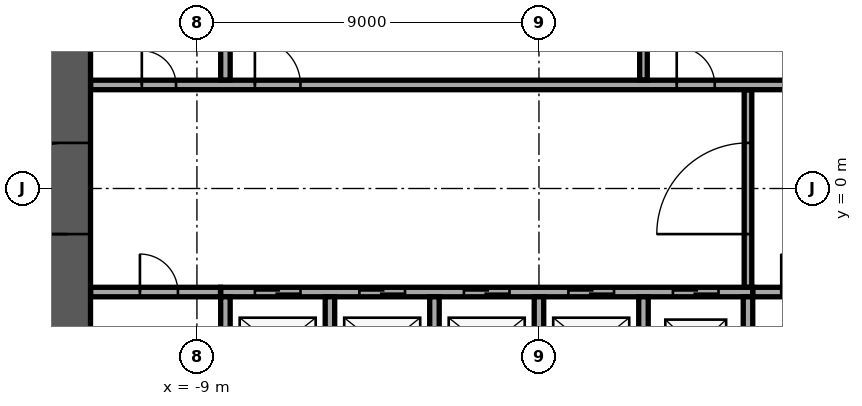
"""IFC4 building model, lengths in metres.
Left out: names, types, materials, properties, quantities, classifications, styles, units other than length and angle.
Written with IfcOpenShell. Run it as: python <this file> out.ifc"""

import sys

from ifc_helpers import new_model, si_unit, direction, frame, frame_2d, origin, place, context, subcontext, project, spatial, rectangle, extrude, element, fill, save


model = new_model("IFC4")
c1 = context("Model", 3, precision=1e-05, world=origin(), true_north=direction((0.0, 1.0)))
c2 = subcontext(c1, "Body", "Model", "MODEL_VIEW")
j1 = project(units=[si_unit("LENGTHUNIT", "METRE"), si_unit("PLANEANGLEUNIT", "RADIAN")], contexts=[c1])
p1 = place(None, origin())
s1 = spatial("IfcSite", under=j1, at=p1, CompositionType="ELEMENT")
p2 = place(p1, origin())
s2 = spatial("IfcBuilding", under=s1, at=p2, CompositionType="ELEMENT")
p3 = place(p2, origin())
s3 = spatial("IfcBuildingStorey", under=s2, at=p3, CompositionType="ELEMENT", Elevation=0.0)
p4 = place(p3, frame((-12.4, -11.8, 0.0), z_axis=(0.0, 0.0, 1.0), x_axis=(0.0, 1.0, 0.0)))
e1 = element("IfcWall", 1, at=p4, inside=s3, PredefinedType="SHEAR", context=c2, shape_type="SweptSolid", body=[
    extrude(rectangle(XDim=23.6, YDim=1.2, at=frame_2d((11.8, 0.0))), origin(), (0.0, 0.0, 1.0), 4.1),
])
p5 = place(p4, frame((10.6, 0.0, 0.0)))
e2 = element("IfcOpeningElement", 2, at=p5, cuts=e1, PredefinedType="OPENING", context=c2, shape_type="SweptSolid", body=[
    extrude(rectangle(XDim=2.4, YDim=2.4, at=frame_2d((1.2, 1.2))), frame((0.0, 0.61, 0.0), z_axis=(0.0, -1.0, 0.0), x_axis=(1.0, 0.0, 0.0)), (0.0, 0.0, 1.0), 1.22),
])
p6 = place(p3, frame((-8.375, -2.725, 0.0), z_axis=(0.0, 0.0, 1.0), x_axis=(1.0, 0.0, 0.0)))
e3 = element("IfcWall", 3, at=p6, inside=s3, PredefinedType="SOLIDWALL", context=c2, shape_type="SweptSolid", body=[
    extrude(rectangle(XDim=14.0, YDim=0.25, at=frame_2d((7.0, 0.0))), origin(), (0.0, 0.0, 1.0), 4.1),
])
p7 = place(p6, frame((0.9, 0.0, 0.0)))
e4 = element("IfcOpeningElement", 4, at=p7, cuts=e3, PredefinedType="OPENING", context=c2, shape_type="SweptSolid", body=[
    extrude(rectangle(XDim=1.2, YDim=2.1, at=frame_2d((0.6, 1.05))), frame((0.0, 0.135, 0.0), z_axis=(0.0, -1.0, 0.0), x_axis=(1.0, 0.0, 0.0)), (0.0, 0.0, 1.0), 0.27),
])
p8 = place(p6, frame((3.65, 0.0, 0.0)))
e5 = element("IfcOpeningElement", 5, at=p8, cuts=e3, PredefinedType="OPENING", context=c2, shape_type="SweptSolid", body=[
    extrude(rectangle(XDim=1.2, YDim=2.1, at=frame_2d((0.6, 1.05))), frame((0.0, 0.135, 0.0), z_axis=(0.0, -1.0, 0.0), x_axis=(1.0, 0.0, 0.0)), (0.0, 0.0, 1.0), 0.27),
])
p9 = place(p6, frame((6.4, 0.0, 0.0)))
e6 = element("IfcOpeningElement", 6, at=p9, cuts=e3, PredefinedType="OPENING", context=c2, shape_type="SweptSolid", body=[
    extrude(rectangle(XDim=1.2, YDim=2.1, at=frame_2d((0.6, 1.05))), frame((0.0, 0.135, 0.0), z_axis=(0.0, -1.0, 0.0), x_axis=(1.0, 0.0, 0.0)), (0.0, 0.0, 1.0), 0.27),
])
p10 = place(p6, frame((9.15, 0.0, 0.0)))
e7 = element("IfcOpeningElement", 7, at=p10, cuts=e3, PredefinedType="OPENING", context=c2, shape_type="SweptSolid", body=[
    extrude(rectangle(XDim=1.2, YDim=2.1, at=frame_2d((0.6, 1.05))), frame((0.0, 0.135, 0.0), z_axis=(0.0, -1.0, 0.0), x_axis=(1.0, 0.0, 0.0)), (0.0, 0.0, 1.0), 0.27),
])
p11 = place(p6, frame((11.9, 0.0, 0.0)))
e8 = element("IfcOpeningElement", 8, at=p11, cuts=e3, PredefinedType="OPENING", context=c2, shape_type="SweptSolid", body=[
    extrude(rectangle(XDim=1.2, YDim=2.1, at=frame_2d((0.6, 1.05))), frame((0.0, 0.135, 0.0), z_axis=(0.0, -1.0, 0.0), x_axis=(1.0, 0.0, 0.0)), (0.0, 0.0, 1.0), 0.27),
])
for number, where, z_axis, x_axis in (
    (9, (-8.25, -5.55, 0.0), (0.0, 0.0, 1.0), (0.0, 1.0, 0.0)),
    (10, (-5.5, -5.55, 0.0), (0.0, 0.0, 1.0), (0.0, 1.0, 0.0)),
    (11, (-2.75, -5.55, 0.0), (0.0, 0.0, 1.0), (0.0, 1.0, 0.0)),
    (12, (0.0, -5.55, 0.0), (0.0, 0.0, 1.0), (0.0, 1.0, 0.0)),
    (13, (2.75, -5.55, 0.0), (0.0, 0.0, 1.0), (0.0, 1.0, 0.0)),
    (14, (5.5, -5.55, 0.0), (0.0, 0.0, 1.0), (0.0, 1.0, 0.0)),
):
    element("IfcWall", number, at=place(p3, frame(where, z_axis=z_axis, x_axis=x_axis)), inside=s3, PredefinedType="SOLIDWALL", context=c2, shape_type="SweptSolid", body=[
        extrude(rectangle(XDim=2.7, YDim=0.25, at=frame_2d((1.35, 0.0))), origin(), (0.0, 0.0, 1.0), 4.1),
    ])
p12 = place(p3, frame((-11.795, -2.725, 0.0), z_axis=(0.0, 0.0, 1.0), x_axis=(1.0, 0.0, 0.0)))
e15 = element("IfcWall", 15, at=p12, inside=s3, PredefinedType="PARTITIONING", context=c2, shape_type="SweptSolid", body=[
    extrude(rectangle(XDim=3.415, YDim=0.25, at=frame_2d((1.708, 0.0))), origin(), (0.0, 0.0, 1.0), 4.1),
])
p13 = place(p12, frame((1.295, 0.0, 0.0)))
e16 = element("IfcOpeningElement", 16, at=p13, cuts=e15, PredefinedType="OPENING", context=c2, shape_type="SweptSolid", body=[
    extrude(rectangle(XDim=1.0, YDim=2.1, at=frame_2d((0.5, 1.05))), frame((0.0, 0.135, 0.0), z_axis=(0.0, -1.0, 0.0), x_axis=(1.0, 0.0, 0.0)), (0.0, 0.0, 1.0), 0.27),
])
p14 = place(p3, frame((5.63, -2.725, 0.0), z_axis=(0.0, 0.0, 1.0), x_axis=(1.0, 0.0, 0.0)))
e17 = element("IfcWall", 17, at=p14, inside=s3, PredefinedType="PARTITIONING", context=c2, shape_type="SweptSolid", body=[
    extrude(rectangle(XDim=6.165, YDim=0.25, at=frame_2d((3.083, 0.0))), origin(), (0.0, 0.0, 1.0), 4.1),
])
p15 = place(p14, frame((0.745, 0.0, 0.0)))
e18 = element("IfcOpeningElement", 18, at=p15, cuts=e17, PredefinedType="OPENING", context=c2, shape_type="SweptSolid", body=[
    extrude(rectangle(XDim=1.0, YDim=2.1, at=frame_2d((0.5, 1.05))), frame((0.0, 0.135, 0.0), z_axis=(0.0, -1.0, 0.0), x_axis=(1.0, 0.0, 0.0)), (0.0, 0.0, 1.0), 0.27),
])
p16 = place(p14, frame((3.92, 0.0, 0.0)))
e19 = element("IfcOpeningElement", 19, at=p16, cuts=e17, PredefinedType="OPENING", context=c2, shape_type="SweptSolid", body=[
    extrude(rectangle(XDim=0.9, YDim=2.1, at=frame_2d((0.45, 1.05))), frame((0.0, 0.135, 0.0), z_axis=(0.0, -1.0, 0.0), x_axis=(1.0, 0.0, 0.0)), (0.0, 0.0, 1.0), 0.27),
])
p17 = place(p3, frame((5.5, -2.595, 0.0), z_axis=(0.0, 0.0, 1.0), x_axis=(0.0, 1.0, 0.0)))
e20 = element("IfcWall", 20, at=p17, inside=s3, PredefinedType="PARTITIONING", context=c2, shape_type="SweptSolid", body=[
    extrude(rectangle(XDim=5.19, YDim=0.2, at=frame_2d((2.595, 0.0))), origin(), (0.0, 0.0, 1.0), 4.1),
])
p18 = place(p17, frame((1.395, 0.0, 0.0)))
e21 = element("IfcOpeningElement", 21, at=p18, cuts=e20, PredefinedType="OPENING", context=c2, shape_type="SweptSolid", body=[
    extrude(rectangle(XDim=2.4, YDim=2.4, at=frame_2d((1.2, 1.2))), frame((0.0, 0.11, 0.0), z_axis=(0.0, -1.0, 0.0), x_axis=(1.0, 0.0, 0.0)), (0.0, 0.0, 1.0), 0.22),
])
p19 = place(p3, frame((-11.795, 2.725, 0.0), z_axis=(0.0, 0.0, 1.0), x_axis=(1.0, 0.0, 0.0)))
e22 = element("IfcWall", 22, at=p19, inside=s3, PredefinedType="PARTITIONING", context=c2, shape_type="SweptSolid", body=[
    extrude(rectangle(XDim=23.59, YDim=0.25, at=frame_2d((11.795, 0.0))), origin(), (0.0, 0.0, 1.0), 4.1),
])
p20 = place(p19, frame((21.345, 0.0, 0.0)))
e23 = element("IfcOpeningElement", 23, at=p20, cuts=e22, PredefinedType="OPENING", context=c2, shape_type="SweptSolid", body=[
    extrude(rectangle(XDim=0.9, YDim=2.1, at=frame_2d((0.45, 1.05))), frame((0.0, 0.135, 0.0), z_axis=(0.0, -1.0, 0.0), x_axis=(1.0, 0.0, 0.0)), (0.0, 0.0, 1.0), 0.27),
])
p21 = place(p19, frame((1.345, 0.0, 0.0)))
e24 = element("IfcOpeningElement", 24, at=p21, cuts=e22, PredefinedType="OPENING", context=c2, shape_type="SweptSolid", body=[
    extrude(rectangle(XDim=0.9, YDim=2.1, at=frame_2d((0.45, 1.05))), frame((0.0, 0.135, 0.0), z_axis=(0.0, -1.0, 0.0), x_axis=(1.0, 0.0, 0.0)), (0.0, 0.0, 1.0), 0.27),
])
p22 = place(p19, frame((4.32, 0.0, 0.0)))
e25 = element("IfcOpeningElement", 25, at=p22, cuts=e22, PredefinedType="OPENING", context=c2, shape_type="SweptSolid", body=[
    extrude(rectangle(XDim=1.2, YDim=2.1, at=frame_2d((0.6, 1.05))), frame((0.0, 0.135, 0.0), z_axis=(0.0, -1.0, 0.0), x_axis=(1.0, 0.0, 0.0)), (0.0, 0.0, 1.0), 0.27),
])
p23 = place(p19, frame((15.42, 0.0, 0.0)))
e26 = element("IfcOpeningElement", 26, at=p23, cuts=e22, PredefinedType="OPENING", context=c2, shape_type="SweptSolid", body=[
    extrude(rectangle(XDim=1.0, YDim=2.1, at=frame_2d((0.5, 1.05))), frame((0.0, 0.135, 0.0), z_axis=(0.0, -1.0, 0.0), x_axis=(1.0, 0.0, 0.0)), (0.0, 0.0, 1.0), 0.27),
])
p24 = place(p3, frame((-8.25, 2.855, 0.0), z_axis=(0.0, 0.0, 1.0), x_axis=(0.0, 1.0, 0.0)))
e27 = element("IfcWall", 27, at=p24, inside=s3, PredefinedType="PARTITIONING", context=c2, shape_type="SweptSolid", body=[
    extrude(rectangle(XDim=1.715, YDim=0.25, at=frame_2d((0.857, 0.0))), origin(), (0.0, 0.0, 1.0), 4.1),
])
p25 = place(p3, frame((2.75, 2.855, 0.0), z_axis=(0.0, 0.0, 1.0), x_axis=(0.0, 1.0, 0.0)))
e28 = element("IfcWall", 28, at=p25, inside=s3, PredefinedType="PARTITIONING", context=c2, shape_type="SweptSolid", body=[
    extrude(rectangle(XDim=2.69, YDim=0.2, at=frame_2d((1.345, 0.0))), origin(), (0.0, 0.0, 1.0), 4.1),
])
p26 = place(p5, origin())
e29 = element("IfcDoor", 29, at=p26, inside=s3, OperationType="SINGLE_SWING_LEFT", PredefinedType="DOOR", context=c2, shape_type="SweptSolid", body=[
    extrude(rectangle(XDim=2.4, YDim=2.4, at=frame_2d((1.2, 1.2))), frame((0.0, 0.025, 0.0), z_axis=(0.0, -1.0, 0.0), x_axis=(1.0, 0.0, 0.0)), (0.0, 0.0, 1.0), 0.05),
])
fill(e2, e29)
p27 = place(p7, origin())
e30 = element("IfcDoor", 30, at=p27, inside=s3, OperationType="DOUBLE_DOOR_SLIDING", PredefinedType="DOOR", context=c2, shape_type="SweptSolid", body=[
    extrude(rectangle(XDim=1.2, YDim=2.1, at=frame_2d((0.6, 1.05))), frame((0.0, 0.025, 0.0), z_axis=(0.0, -1.0, 0.0), x_axis=(1.0, 0.0, 0.0)), (0.0, 0.0, 1.0), 0.05),
])
fill(e4, e30)
p28 = place(p8, origin())
e31 = element("IfcDoor", 31, at=p28, inside=s3, OperationType="DOUBLE_DOOR_SLIDING", PredefinedType="DOOR", context=c2, shape_type="SweptSolid", body=[
    extrude(rectangle(XDim=1.2, YDim=2.1, at=frame_2d((0.6, 1.05))), frame((0.0, 0.025, 0.0), z_axis=(0.0, -1.0, 0.0), x_axis=(1.0, 0.0, 0.0)), (0.0, 0.0, 1.0), 0.05),
])
fill(e5, e31)
p29 = place(p9, origin())
e32 = element("IfcDoor", 32, at=p29, inside=s3, OperationType="DOUBLE_DOOR_SLIDING", PredefinedType="DOOR", context=c2, shape_type="SweptSolid", body=[
    extrude(rectangle(XDim=1.2, YDim=2.1, at=frame_2d((0.6, 1.05))), frame((0.0, 0.025, 0.0), z_axis=(0.0, -1.0, 0.0), x_axis=(1.0, 0.0, 0.0)), (0.0, 0.0, 1.0), 0.05),
])
fill(e6, e32)
p30 = place(p10, origin())
e33 = element("IfcDoor", 33, at=p30, inside=s3, OperationType="DOUBLE_DOOR_SLIDING", PredefinedType="DOOR", context=c2, shape_type="SweptSolid", body=[
    extrude(rectangle(XDim=1.2, YDim=2.1, at=frame_2d((0.6, 1.05))), frame((0.0, 0.025, 0.0), z_axis=(0.0, -1.0, 0.0), x_axis=(1.0, 0.0, 0.0)), (0.0, 0.0, 1.0), 0.05),
])
fill(e7, e33)
p31 = place(p11, origin())
e34 = element("IfcDoor", 34, at=p31, inside=s3, OperationType="DOUBLE_DOOR_SLIDING", PredefinedType="DOOR", context=c2, shape_type="SweptSolid", body=[
    extrude(rectangle(XDim=1.2, YDim=2.1, at=frame_2d((0.6, 1.05))), frame((0.0, 0.025, 0.0), z_axis=(0.0, -1.0, 0.0), x_axis=(1.0, 0.0, 0.0)), (0.0, 0.0, 1.0), 0.05),
])
fill(e8, e34)
p32 = place(p13, origin())
e35 = element("IfcDoor", 35, at=p32, inside=s3, OperationType="SINGLE_SWING_LEFT", PredefinedType="DOOR", context=c2, shape_type="SweptSolid", body=[
    extrude(rectangle(XDim=1.0, YDim=2.1, at=frame_2d((0.5, 1.05))), frame((0.0, 0.025, 0.0), z_axis=(0.0, -1.0, 0.0), x_axis=(1.0, 0.0, 0.0)), (0.0, 0.0, 1.0), 0.05),
])
fill(e16, e35)
p33 = place(p15, origin())
e36 = element("IfcDoor", 36, at=p33, inside=s3, OperationType="SINGLE_SWING_LEFT", PredefinedType="DOOR", context=c2, shape_type="SweptSolid", body=[
    extrude(rectangle(XDim=1.0, YDim=2.1, at=frame_2d((0.5, 1.05))), frame((0.0, 0.025, 0.0), z_axis=(0.0, -1.0, 0.0), x_axis=(1.0, 0.0, 0.0)), (0.0, 0.0, 1.0), 0.05),
])
fill(e18, e36)
p34 = place(p21, origin())
e37 = element("IfcDoor", 37, at=p34, inside=s3, OperationType="SINGLE_SWING_LEFT", PredefinedType="DOOR", context=c2, shape_type="SweptSolid", body=[
    extrude(rectangle(XDim=0.9, YDim=2.1, at=frame_2d((0.45, 1.05))), frame((0.0, 0.025, 0.0), z_axis=(0.0, -1.0, 0.0), x_axis=(1.0, 0.0, 0.0)), (0.0, 0.0, 1.0), 0.05),
])
fill(e24, e37)
p35 = place(p22, origin())
e38 = element("IfcDoor", 38, at=p35, inside=s3, OperationType="SINGLE_SWING_LEFT", PredefinedType="DOOR", context=c2, shape_type="SweptSolid", body=[
    extrude(rectangle(XDim=1.2, YDim=2.1, at=frame_2d((0.6, 1.05))), frame((0.0, 0.025, 0.0), z_axis=(0.0, -1.0, 0.0), x_axis=(1.0, 0.0, 0.0)), (0.0, 0.0, 1.0), 0.05),
])
fill(e25, e38)
p36 = place(p23, origin())
e39 = element("IfcDoor", 39, at=p36, inside=s3, OperationType="SINGLE_SWING_LEFT", PredefinedType="DOOR", context=c2, shape_type="SweptSolid", body=[
    extrude(rectangle(XDim=1.0, YDim=2.1, at=frame_2d((0.5, 1.05))), frame((0.0, 0.025, 0.0), z_axis=(0.0, -1.0, 0.0), x_axis=(1.0, 0.0, 0.0)), (0.0, 0.0, 1.0), 0.05),
])
fill(e26, e39)
p37 = place(p18, origin())
e40 = element("IfcDoor", 40, at=p37, inside=s3, OperationType="SINGLE_SWING_LEFT", PredefinedType="DOOR", context=c2, shape_type="SweptSolid", body=[
    extrude(rectangle(XDim=2.4, YDim=2.4, at=frame_2d((1.2, 1.2))), frame((0.0, 0.025, 0.0), z_axis=(0.0, -1.0, 0.0), x_axis=(1.0, 0.0, 0.0)), (0.0, 0.0, 1.0), 0.05),
])
fill(e21, e40)
save(model, sys.argv[1])
